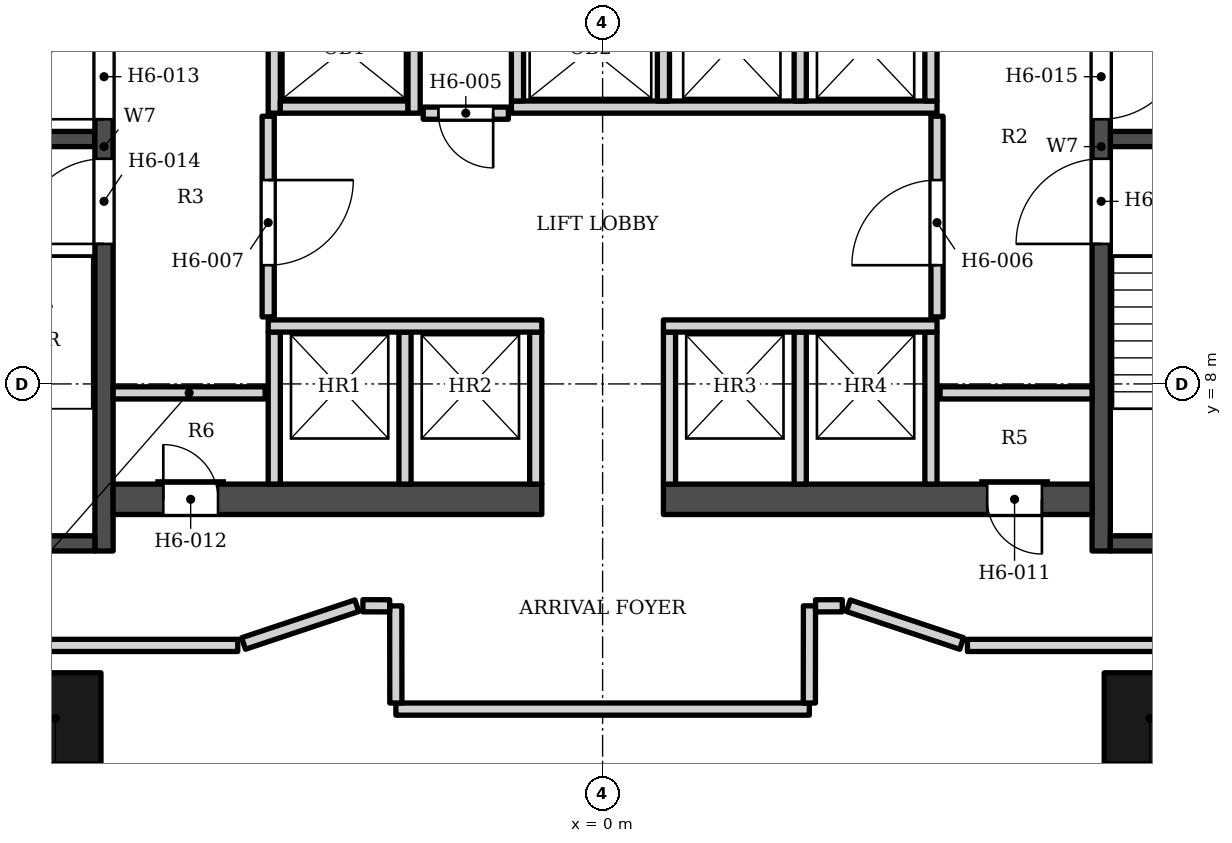
"""IFC4 building model, lengths in metres.
Left out: names, types, materials, properties, quantities, classifications, styles, units other than length and angle.
Written with IfcOpenShell. Run it as: python <this file> out.ifc"""

import sys

from ifc_helpers import new_model, si_unit, direction, frame, frame_2d, origin, origin_2d, place, context, subcontext, project, spatial, rectangle, extrude, element, fill, save


model = new_model("IFC4")
c1 = context("Model", 3, precision=1e-05, world=origin(), true_north=direction((0.0, 1.0)))
c2 = subcontext(c1, "Body", "Model", "MODEL_VIEW")
j1 = project(units=[si_unit("LENGTHUNIT", "METRE"), si_unit("PLANEANGLEUNIT", "RADIAN")], contexts=[c1])
p1 = place(None, origin())
s1 = spatial("IfcSite", under=j1, at=p1, CompositionType="ELEMENT")
p2 = place(p1, origin())
s2 = spatial("IfcBuilding", under=s1, at=p2, CompositionType="ELEMENT")
p3 = place(p2, frame((0.0, 0.0, 102.0)))
s3 = spatial("IfcBuildingStorey", under=s2, at=p3, CompositionType="ELEMENT", Elevation=102.0)
p4 = place(p3, frame((-8.2, 5.253, 0.0), z_axis=(0.0, 0.0, 1.0), x_axis=(0.0, 1.0, 0.0)))
e1 = element("IfcWall", 1, at=p4, inside=s3, PredefinedType="SHEAR", context=c2, shape_type="SweptSolid", body=[
    extrude(rectangle(XDim=13.3, YDim=0.3, at=frame_2d((6.65, 0.0))), origin(), (0.0, 0.0, 1.0), 3.4),
])
p5 = place(p4, frame((7.1, 0.0, 0.0)))
e2 = element("IfcOpeningElement", 2, at=p5, cuts=e1, PredefinedType="OPENING", context=c2, shape_type="SweptSolid", body=[
    extrude(rectangle(XDim=1.4, YDim=2.1, at=frame_2d((0.7, 1.05))), frame((0.0, 0.16, 0.0), z_axis=(0.0, -1.0, 0.0), x_axis=(1.0, 0.0, 0.0)), (0.0, 0.0, 1.0), 0.32),
])
p6 = place(p4, frame((5.05, 0.0, 0.0)))
e3 = element("IfcOpeningElement", 3, at=p6, cuts=e1, PredefinedType="OPENING", context=c2, shape_type="SweptSolid", body=[
    extrude(rectangle(XDim=1.4, YDim=2.1, at=frame_2d((0.7, 1.05))), frame((0.0, 0.16, 0.0), z_axis=(0.0, -1.0, 0.0), x_axis=(1.0, 0.0, 0.0)), (0.0, 0.0, 1.0), 0.32),
])
for number, where, z_axis, x_axis in (
    (4, (-12.1, 12.028, 0.0), (0.0, 0.0, 1.0), (1.0, 0.0, 0.0)),
    (5, (-12.1, 5.378, 0.0), (0.0, 0.0, 1.0), (1.0, 0.0, 0.0)),
):
    element("IfcWall", number, at=place(p3, frame(where, z_axis=z_axis, x_axis=x_axis)), inside=s3, PredefinedType="SHEAR", context=c2, shape_type="SweptSolid", body=[
        extrude(rectangle(XDim=3.75, YDim=0.25, at=frame_2d((1.875, 0.0))), origin(), (0.0, 0.0, 1.0), 3.4),
    ])
p7 = place(p3, frame((8.2, 5.253, 0.0), z_axis=(0.0, 0.0, 1.0), x_axis=(0.0, 1.0, 0.0)))
e6 = element("IfcWall", 6, at=p7, inside=s3, PredefinedType="SHEAR", context=c2, shape_type="SweptSolid", body=[
    extrude(rectangle(XDim=13.3, YDim=0.3, at=frame_2d((6.65, 0.0))), origin(), (0.0, 0.0, 1.0), 3.4),
])
p8 = place(p7, frame((7.1, 0.0, 0.0)))
e7 = element("IfcOpeningElement", 7, at=p8, cuts=e6, PredefinedType="OPENING", context=c2, shape_type="SweptSolid", body=[
    extrude(rectangle(XDim=1.4, YDim=2.1, at=frame_2d((0.7, 1.05))), frame((0.0, 0.16, 0.0), z_axis=(0.0, -1.0, 0.0), x_axis=(1.0, 0.0, 0.0)), (0.0, 0.0, 1.0), 0.32),
])
p9 = place(p7, frame((5.05, 0.0, 0.0)))
e8 = element("IfcOpeningElement", 8, at=p9, cuts=e6, PredefinedType="OPENING", context=c2, shape_type="SweptSolid", body=[
    extrude(rectangle(XDim=1.4, YDim=2.1, at=frame_2d((0.7, 1.05))), frame((0.0, 0.16, 0.0), z_axis=(0.0, -1.0, 0.0), x_axis=(1.0, 0.0, 0.0)), (0.0, 0.0, 1.0), 0.32),
])
for number, where, z_axis, x_axis in (
    (9, (8.35, 12.028, 0.0), (0.0, 0.0, 1.0), (1.0, 0.0, 0.0)),
    (10, (8.35, 5.378, 0.0), (0.0, 0.0, 1.0), (1.0, 0.0, 0.0)),
):
    element("IfcWall", number, at=place(p3, frame(where, z_axis=z_axis, x_axis=x_axis)), inside=s3, PredefinedType="SHEAR", context=c2, shape_type="SweptSolid", body=[
        extrude(rectangle(XDim=3.75, YDim=0.25, at=frame_2d((1.875, 0.0))), origin(), (0.0, 0.0, 1.0), 3.4),
    ])
p10 = place(p3, frame((-8.05, 6.103, 0.0), z_axis=(0.0, 0.0, 1.0), x_axis=(1.0, 0.0, 0.0)))
e11 = element("IfcWall", 11, at=p10, inside=s3, PredefinedType="SHEAR", context=c2, shape_type="SweptSolid", body=[
    extrude(rectangle(XDim=7.05, YDim=0.5, at=frame_2d((3.525, 0.0))), origin(), (0.0, 0.0, 1.0), 3.4),
])
p11 = place(p10, frame((0.825, 0.0, 0.0)))
e12 = element("IfcOpeningElement", 12, at=p11, cuts=e11, PredefinedType="OPENING", context=c2, shape_type="SweptSolid", body=[
    extrude(rectangle(XDim=0.9, YDim=2.1, at=frame_2d((0.45, 1.05))), frame((0.0, 0.26, 0.0), z_axis=(0.0, -1.0, 0.0), x_axis=(1.0, 0.0, 0.0)), (0.0, 0.0, 1.0), 0.52),
])
p12 = place(p3, frame((1.0, 6.103, 0.0), z_axis=(0.0, 0.0, 1.0), x_axis=(1.0, 0.0, 0.0)))
e13 = element("IfcWall", 13, at=p12, inside=s3, PredefinedType="SHEAR", context=c2, shape_type="SweptSolid", body=[
    extrude(rectangle(XDim=7.05, YDim=0.5, at=frame_2d((3.525, 0.0))), origin(), (0.0, 0.0, 1.0), 3.4),
])
p13 = place(p12, frame((5.325, 0.0, 0.0)))
e14 = element("IfcOpeningElement", 14, at=p13, cuts=e13, PredefinedType="OPENING", context=c2, shape_type="SweptSolid", body=[
    extrude(rectangle(XDim=0.9, YDim=2.1, at=frame_2d((0.45, 1.05))), frame((0.0, 0.26, 0.0), z_axis=(0.0, -1.0, 0.0), x_axis=(1.0, 0.0, 0.0)), (0.0, 0.0, 1.0), 0.52),
])
for number, where, z_axis, x_axis in (
    (15, (-9.0, 2.5, 0.0), (0.0, 0.0, 1.0), (1.0, 0.0, 0.0)),
    (16, (9.0, 2.5, 0.0), (0.0, 0.0, 1.0), (1.0, 0.0, 0.0)),
):
    element("IfcColumn", number, at=place(p3, frame(where, z_axis=z_axis, x_axis=x_axis)), inside=s3, PredefinedType="COLUMN", context=c2, shape_type="SweptSolid", body=[
        extrude(rectangle(XDim=1.5, YDim=1.5, at=origin_2d()), origin(), (0.0, 0.0, 1.0), 3.4),
    ])
for number, where, z_axis, x_axis in (
    (17, (-5.4, 6.353, 0.0), (0.0, 0.0, 1.0), (0.0, 1.0, 0.0)),
    (18, (-3.25, 6.353, 0.0), (0.0, 0.0, 1.0), (0.0, 1.0, 0.0)),
    (19, (-1.1, 6.353, 0.0), (0.0, 0.0, 1.0), (0.0, 1.0, 0.0)),
    (20, (1.1, 6.353, 0.0), (0.0, 0.0, 1.0), (0.0, 1.0, 0.0)),
    (21, (3.25, 6.353, 0.0), (0.0, 0.0, 1.0), (0.0, 1.0, 0.0)),
    (22, (5.4, 6.353, 0.0), (0.0, 0.0, 1.0), (0.0, 1.0, 0.0)),
    (23, (-8.05, 7.853, 0.0), (0.0, 0.0, 1.0), (1.0, 0.0, 0.0)),
    (24, (5.55, 7.853, 0.0), (0.0, 0.0, 1.0), (1.0, 0.0, 0.0)),
):
    element("IfcWall", number, at=place(p3, frame(where, z_axis=z_axis, x_axis=x_axis)), inside=s3, PredefinedType="SOLIDWALL", context=c2, shape_type="SweptSolid", body=[
        extrude(rectangle(XDim=2.5, YDim=0.2, at=frame_2d((1.25, 0.0))), origin(), (0.0, 0.0, 1.0), 3.23),
    ])
for number, where, z_axis, x_axis in (
    (25, (-5.5, 8.953, 0.0), (0.0, 0.0, 1.0), (1.0, 0.0, 0.0)),
    (26, (1.0, 8.953, 0.0), (0.0, 0.0, 1.0), (1.0, 0.0, 0.0)),
):
    element("IfcWall", number, at=place(p3, frame(where, z_axis=z_axis, x_axis=x_axis)), inside=s3, PredefinedType="SOLIDWALL", context=c2, shape_type="SweptSolid", body=[
        extrude(rectangle(XDim=4.5, YDim=0.2, at=frame_2d((2.25, 0.0))), origin(), (0.0, 0.0, 1.0), 3.23),
    ])
p14 = place(p3, frame((-5.5, 9.103, 0.0), z_axis=(0.0, 0.0, 1.0), x_axis=(0.0, 1.0, 0.0)))
e27 = element("IfcWall", 27, at=p14, inside=s3, PredefinedType="SOLIDWALL", context=c2, shape_type="SweptSolid", body=[
    extrude(rectangle(XDim=3.3, YDim=0.2, at=frame_2d((1.65, 0.0))), origin(), (0.0, 0.0, 1.0), 3.23),
])
p15 = place(p14, frame((0.85, 0.0, 0.0)))
e28 = element("IfcOpeningElement", 28, at=p15, cuts=e27, PredefinedType="OPENING", context=c2, shape_type="SweptSolid", body=[
    extrude(rectangle(XDim=1.4, YDim=2.1, at=frame_2d((0.7, 1.05))), frame((0.0, 0.11, 0.0), z_axis=(0.0, -1.0, 0.0), x_axis=(1.0, 0.0, 0.0)), (0.0, 0.0, 1.0), 0.22),
])
p16 = place(p3, frame((5.5, 9.103, 0.0), z_axis=(0.0, 0.0, 1.0), x_axis=(0.0, 1.0, 0.0)))
e29 = element("IfcWall", 29, at=p16, inside=s3, PredefinedType="SOLIDWALL", context=c2, shape_type="SweptSolid", body=[
    extrude(rectangle(XDim=3.3, YDim=0.2, at=frame_2d((1.65, 0.0))), origin(), (0.0, 0.0, 1.0), 3.23),
])
p17 = place(p16, frame((0.85, 0.0, 0.0)))
e30 = element("IfcOpeningElement", 30, at=p17, cuts=e29, PredefinedType="OPENING", context=c2, shape_type="SweptSolid", body=[
    extrude(rectangle(XDim=1.4, YDim=2.1, at=frame_2d((0.7, 1.05))), frame((0.0, 0.11, 0.0), z_axis=(0.0, -1.0, 0.0), x_axis=(1.0, 0.0, 0.0)), (0.0, 0.0, 1.0), 0.22),
])
p18 = place(p3, frame((-2.95, 12.453, 0.0), z_axis=(0.0, 0.0, 1.0), x_axis=(1.0, 0.0, 0.0)))
e31 = element("IfcWall", 31, at=p18, inside=s3, PredefinedType="SOLIDWALL", context=c2, shape_type="SweptSolid", body=[
    extrude(rectangle(XDim=1.4, YDim=0.2, at=frame_2d((0.7, 0.0))), origin(), (0.0, 0.0, 1.0), 3.23),
])
p19 = place(p18, frame((0.25, 0.0, 0.0)))
e32 = element("IfcOpeningElement", 32, at=p19, cuts=e31, PredefinedType="OPENING", context=c2, shape_type="SweptSolid", body=[
    extrude(rectangle(XDim=0.9, YDim=2.1, at=frame_2d((0.45, 1.05))), frame((0.0, 0.11, 0.0), z_axis=(0.0, -1.0, 0.0), x_axis=(1.0, 0.0, 0.0)), (0.0, 0.0, 1.0), 0.22),
])
p20 = place(p3, frame((-5.4, 12.453, 0.0), z_axis=(0.0, 0.0, 1.0), x_axis=(0.0, 1.0, 0.0)))
e33 = element("IfcWall", 33, at=p20, inside=s3, PredefinedType="SOLIDWALL", context=c2, shape_type="SweptSolid", body=[
    extrude(rectangle(XDim=3.0, YDim=0.2, at=frame_2d((1.5, 0.0))), origin(), (0.0, 0.0, 1.0), 3.23),
])
p21 = place(p3, frame((-5.3, 12.552, 0.0), z_axis=(0.0, 0.0, 1.0), x_axis=(1.0, 0.0, 0.0)))
e34 = element("IfcWall", 34, at=p21, inside=s3, PredefinedType="SOLIDWALL", context=c2, shape_type="SweptSolid", body=[
    extrude(rectangle(XDim=2.1, YDim=0.2, at=frame_2d((1.05, 0.0))), origin(), (0.0, 0.0, 1.0), 3.23),
])
p22 = place(p3, frame((-3.1, 12.453, 0.0), z_axis=(0.0, 0.0, 1.0), x_axis=(0.0, 1.0, 0.0)))
e35 = element("IfcWall", 35, at=p22, inside=s3, PredefinedType="SOLIDWALL", context=c2, shape_type="SweptSolid", body=[
    extrude(rectangle(XDim=3.0, YDim=0.2, at=frame_2d((1.5, 0.0))), origin(), (0.0, 0.0, 1.0), 3.23),
])
p23 = place(p3, frame((-1.5, 12.552, 0.0), z_axis=(0.0, 0.0, 1.0), x_axis=(1.0, 0.0, 0.0)))
e36 = element("IfcWall", 36, at=p23, inside=s3, PredefinedType="SOLIDWALL", context=c2, shape_type="SweptSolid", body=[
    extrude(rectangle(XDim=7.0, YDim=0.2, at=frame_2d((3.5, 0.0))), origin(), (0.0, 0.0, 1.0), 3.23),
])
for number, where, z_axis, x_axis in (
    (37, (-1.4, 12.653, 0.0), (0.0, 0.0, 1.0), (0.0, 1.0, 0.0)),
    (38, (1.0, 12.653, 0.0), (0.0, 0.0, 1.0), (0.0, 1.0, 0.0)),
    (39, (3.25, 12.653, 0.0), (0.0, 0.0, 1.0), (0.0, 1.0, 0.0)),
):
    element("IfcWall", number, at=place(p3, frame(where, z_axis=z_axis, x_axis=x_axis)), inside=s3, PredefinedType="SOLIDWALL", context=c2, shape_type="SweptSolid", body=[
        extrude(rectangle(XDim=2.6, YDim=0.2, at=frame_2d((1.3, 0.0))), origin(), (0.0, 0.0, 1.0), 3.23),
    ])
p24 = place(p3, frame((5.4, 12.653, 0.0), z_axis=(0.0, 0.0, 1.0), x_axis=(0.0, 1.0, 0.0)))
e40 = element("IfcWall", 40, at=p24, inside=s3, PredefinedType="SOLIDWALL", context=c2, shape_type="SweptSolid", body=[
    extrude(rectangle(XDim=1.6, YDim=0.2, at=frame_2d((0.8, 0.0))), origin(), (0.0, 0.0, 1.0), 3.23),
])
p25 = place(p3, frame((4.201, -8.791, 0.0), z_axis=(0.0, 0.0, 1.0), x_axis=(0.500109238176, 0.865962325907, 0.0)))
e41 = element("IfcWall", 41, at=p25, inside=s3, PredefinedType="PARTITIONING", context=c2, shape_type="SweptSolid", body=[
    extrude(rectangle(XDim=14.424, YDim=0.2, at=frame_2d((7.212, 0.0))), origin(), (0.0, 0.0, 1.0), 2.384),
])
p26 = place(p25, frame((7.839, 0.0, 0.0)))
e42 = element("IfcOpeningElement", 42, at=p26, cuts=e41, PredefinedType="OPENING", context=c2, shape_type="SweptSolid", body=[
    extrude(rectangle(XDim=1.6, YDim=2.1, at=frame_2d((0.8, 1.05))), frame((0.0, 0.11, 0.0), z_axis=(0.0, -1.0, 0.0), x_axis=(1.0, 0.0, 0.0)), (0.0, 0.0, 1.0), 0.22),
])
p27 = place(p25, frame((4.58, 0.0, 0.0)))
e43 = element("IfcOpeningElement", 43, at=p27, cuts=e41, PredefinedType="OPENING", context=c2, shape_type="SweptSolid", body=[
    extrude(rectangle(XDim=1.6, YDim=2.1, at=frame_2d((0.8, 1.05))), frame((0.0, 0.11, 0.0), z_axis=(0.0, -1.0, 0.0), x_axis=(1.0, 0.0, 0.0)), (0.0, 0.0, 1.0), 0.22),
])
p28 = place(p3, frame((-3.4, 2.652, 0.0), z_axis=(0.0, 0.0, 1.0), x_axis=(1.0, 0.0, 0.0)))
e44 = element("IfcWall", 44, at=p28, inside=s3, PredefinedType="PARTITIONING", context=c2, shape_type="SweptSolid", body=[
    extrude(rectangle(XDim=6.8, YDim=0.2, at=frame_2d((3.4, 0.0))), origin(), (0.0, 0.0, 1.0), 2.474),
])
p29 = place(p3, frame((-3.402, 4.351, 0.0), z_axis=(0.0, 0.0, 1.0), x_axis=(0.001222119466, -0.999999253212, 0.0)))
e45 = element("IfcWall", 45, at=p29, inside=s3, PredefinedType="PARTITIONING", context=c2, shape_type="SweptSolid", body=[
    extrude(rectangle(XDim=1.598, YDim=0.2, at=frame_2d((0.799, 0.0))), origin(), (0.0, 0.0, 1.0), 3.23),
])
p30 = place(p3, frame((-12.913, 3.699, 0.0), z_axis=(0.0, 0.0, 1.0), x_axis=(0.499907630167, -0.866078726964, 0.0)))
e46 = element("IfcWall", 46, at=p30, inside=s3, PredefinedType="PARTITIONING", context=c2, shape_type="SweptSolid", body=[
    extrude(rectangle(XDim=26.06, YDim=0.2, at=frame_2d((13.03, 0.0))), origin(), (0.0, 0.0, 1.0), 2.384),
])
p31 = place(p30, frame((6.312, 0.0, 0.0)))
e47 = element("IfcOpeningElement", 47, at=p31, cuts=e46, PredefinedType="OPENING", context=c2, shape_type="SweptSolid", body=[
    extrude(rectangle(XDim=1.6, YDim=2.1, at=frame_2d((0.8, 1.05))), frame((0.0, 0.11, 0.0), z_axis=(0.0, -1.0, 0.0), x_axis=(1.0, 0.0, 0.0)), (0.0, 0.0, 1.0), 0.22),
])
p32 = place(p30, frame((14.662, 0.0, 0.0)))
e48 = element("IfcOpeningElement", 48, at=p32, cuts=e46, PredefinedType="OPENING", context=c2, shape_type="SweptSolid", body=[
    extrude(rectangle(XDim=1.1, YDim=2.1, at=frame_2d((0.55, 1.05))), frame((0.0, 0.11, 0.0), z_axis=(0.0, -1.0, 0.0), x_axis=(1.0, 0.0, 0.0)), (0.0, 0.0, 1.0), 0.22),
])
p33 = place(p30, frame((23.911, 0.0, 0.0)))
e49 = element("IfcOpeningElement", 49, at=p33, cuts=e46, PredefinedType="OPENING", context=c2, shape_type="SweptSolid", body=[
    extrude(rectangle(XDim=1.1, YDim=2.1, at=frame_2d((0.55, 1.05))), frame((0.0, 0.11, 0.0), z_axis=(0.0, -1.0, 0.0), x_axis=(1.0, 0.0, 0.0)), (0.0, 0.0, 1.0), 0.22),
])
p34 = place(p3, frame((-11.18, 3.7, 0.0), z_axis=(0.0, 0.0, 1.0), x_axis=(0.499994992015, -0.866028295127, 0.0)))
e50 = element("IfcWall", 50, at=p34, inside=s3, PredefinedType="PARTITIONING", context=c2, shape_type="SweptSolid", body=[
    extrude(rectangle(XDim=14.423, YDim=0.2, at=frame_2d((7.211, 0.0))), origin(), (0.0, 0.0, 1.0), 2.384),
])
p35 = place(p3, frame((-11.08, 3.7, 0.0), z_axis=(0.0, 0.0, 1.0), x_axis=(1.0, 0.0, 0.0)))
e51 = element("IfcWall", 51, at=p35, inside=s3, PredefinedType="PARTITIONING", context=c2, shape_type="SweptSolid", body=[
    extrude(rectangle(XDim=5.08, YDim=0.2, at=frame_2d((2.54, 0.0))), origin(), (0.0, 0.0, 1.0), 2.832),
])
p36 = place(p3, frame((6.0, 3.7, 0.0), z_axis=(0.0, 0.0, 1.0), x_axis=(1.0, 0.0, 0.0)))
e52 = element("IfcWall", 52, at=p36, inside=s3, PredefinedType="PARTITIONING", context=c2, shape_type="SweptSolid", body=[
    extrude(rectangle(XDim=5.315, YDim=0.2, at=frame_2d((2.657, 0.0))), origin(), (0.0, 0.0, 1.0), 2.832),
])
for number, where, z_axis, x_axis in (
    (53, (4.042, 4.352, 0.0), (0.0, 0.0, 1.0), (0.949, -0.316, 0.0)),
    (54, (-5.905, 3.731, 0.0), (0.0, 0.0, 1.0), (0.949, 0.316, 0.0)),
):
    element("IfcWall", number, at=place(p3, frame(where, z_axis=z_axis, x_axis=x_axis)), inside=s3, PredefinedType="PARTITIONING", context=c2, shape_type="SweptSolid", body=[
        extrude(rectangle(XDim=1.964, YDim=0.2, at=frame_2d((0.982, 0.0))), origin(), (0.0, 0.0, 1.0), 2.384),
    ])
p37 = place(p3, frame((-3.942, 4.352, 0.0), z_axis=(0.0, 0.0, 1.0), x_axis=(0.999996159087, -0.00277160798, 0.0)))
e55 = element("IfcWall", 55, at=p37, inside=s3, PredefinedType="PARTITIONING", context=c2, shape_type="SweptSolid", body=[
    extrude(rectangle(XDim=0.44, YDim=0.2, at=frame_2d((0.22, 0.0))), origin(), (0.0, 0.0, 1.0), 3.23),
])
p38 = place(p3, frame((3.4, 2.752, 0.0), z_axis=(0.0, 0.0, 1.0), x_axis=(0.001222119466, 0.999999253212, 0.0)))
e56 = element("IfcWall", 56, at=p38, inside=s3, PredefinedType="PARTITIONING", context=c2, shape_type="SweptSolid", body=[
    extrude(rectangle(XDim=1.598, YDim=0.2, at=frame_2d((0.799, 0.0))), origin(), (0.0, 0.0, 1.0), 3.23),
])
p39 = place(p3, frame((3.502, 4.351, 0.0), z_axis=(0.0, 0.0, 1.0), x_axis=(0.999996159087, 0.00277160798, 0.0)))
e57 = element("IfcWall", 57, at=p39, inside=s3, PredefinedType="PARTITIONING", context=c2, shape_type="SweptSolid", body=[
    extrude(rectangle(XDim=0.44, YDim=0.2, at=frame_2d((0.22, 0.0))), origin(), (0.0, 0.0, 1.0), 3.23),
])
p40 = place(p5, origin())
e58 = element("IfcDoor", 58, at=p40, inside=s3, OperationType="SINGLE_SWING_LEFT", PredefinedType="DOOR", context=c2, shape_type="SweptSolid", body=[
    extrude(rectangle(XDim=1.4, YDim=2.1, at=frame_2d((0.7, 1.05))), frame((0.0, 0.025, 0.0), z_axis=(0.0, -1.0, 0.0), x_axis=(1.0, 0.0, 0.0)), (0.0, 0.0, 1.0), 0.05),
])
fill(e2, e58)
p41 = place(p6, origin())
e59 = element("IfcDoor", 59, at=p41, inside=s3, OperationType="SINGLE_SWING_LEFT", PredefinedType="DOOR", context=c2, shape_type="SweptSolid", body=[
    extrude(rectangle(XDim=1.4, YDim=2.1, at=frame_2d((0.7, 1.05))), frame((0.0, 0.025, 0.0), z_axis=(0.0, -1.0, 0.0), x_axis=(1.0, 0.0, 0.0)), (0.0, 0.0, 1.0), 0.05),
])
fill(e3, e59)
p42 = place(p8, origin())
e60 = element("IfcDoor", 60, at=p42, inside=s3, OperationType="SINGLE_SWING_RIGHT", PredefinedType="DOOR", context=c2, shape_type="SweptSolid", body=[
    extrude(rectangle(XDim=1.4, YDim=2.1, at=frame_2d((0.7, 1.05))), frame((0.0, 0.025, 0.0), z_axis=(0.0, -1.0, 0.0), x_axis=(1.0, 0.0, 0.0)), (0.0, 0.0, 1.0), 0.05),
])
fill(e7, e60)
p43 = place(p9, origin())
e61 = element("IfcDoor", 61, at=p43, inside=s3, OperationType="SINGLE_SWING_LEFT", PredefinedType="DOOR", context=c2, shape_type="SweptSolid", body=[
    extrude(rectangle(XDim=1.4, YDim=2.1, at=frame_2d((0.7, 1.05))), frame((0.0, 0.025, 0.0), z_axis=(0.0, -1.0, 0.0), x_axis=(1.0, 0.0, 0.0)), (0.0, 0.0, 1.0), 0.05),
])
fill(e8, e61)
p44 = place(p19, origin())
e62 = element("IfcDoor", 62, at=p44, inside=s3, OperationType="SINGLE_SWING_RIGHT", PredefinedType="DOOR", context=c2, shape_type="SweptSolid", body=[
    extrude(rectangle(XDim=0.9, YDim=2.1, at=frame_2d((0.45, 1.05))), frame((0.0, 0.025, 0.0), z_axis=(0.0, -1.0, 0.0), x_axis=(1.0, 0.0, 0.0)), (0.0, 0.0, 1.0), 0.05),
])
fill(e32, e62)
p45 = place(p15, origin())
e63 = element("IfcDoor", 63, at=p45, inside=s3, OperationType="SINGLE_SWING_RIGHT", PredefinedType="DOOR", context=c2, shape_type="SweptSolid", body=[
    extrude(rectangle(XDim=1.4, YDim=2.1, at=frame_2d((0.7, 1.05))), frame((0.0, 0.025, 0.0), z_axis=(0.0, -1.0, 0.0), x_axis=(1.0, 0.0, 0.0)), (0.0, 0.0, 1.0), 0.05),
])
fill(e28, e63)
p46 = place(p17, origin())
e64 = element("IfcDoor", 64, at=p46, inside=s3, OperationType="SINGLE_SWING_LEFT", PredefinedType="DOOR", context=c2, shape_type="SweptSolid", body=[
    extrude(rectangle(XDim=1.4, YDim=2.1, at=frame_2d((0.7, 1.05))), frame((0.0, 0.025, 0.0), z_axis=(0.0, -1.0, 0.0), x_axis=(1.0, 0.0, 0.0)), (0.0, 0.0, 1.0), 0.05),
])
fill(e30, e64)
p47 = place(p11, origin())
e65 = element("IfcDoor", 65, at=p47, inside=s3, OperationType="SINGLE_SWING_LEFT", PredefinedType="DOOR", context=c2, shape_type="SweptSolid", body=[
    extrude(rectangle(XDim=0.9, YDim=2.1, at=frame_2d((0.45, 1.05))), frame((0.0, 0.025, 0.0), z_axis=(0.0, -1.0, 0.0), x_axis=(1.0, 0.0, 0.0)), (0.0, 0.0, 1.0), 0.05),
])
fill(e12, e65)
p48 = place(p13, origin())
e66 = element("IfcDoor", 66, at=p48, inside=s3, OperationType="SINGLE_SWING_RIGHT", PredefinedType="DOOR", context=c2, shape_type="SweptSolid", body=[
    extrude(rectangle(XDim=0.9, YDim=2.1, at=frame_2d((0.45, 1.05))), frame((0.0, 0.025, 0.0), z_axis=(0.0, -1.0, 0.0), x_axis=(1.0, 0.0, 0.0)), (0.0, 0.0, 1.0), 0.05),
])
fill(e14, e66)
save(model, sys.argv[1])
